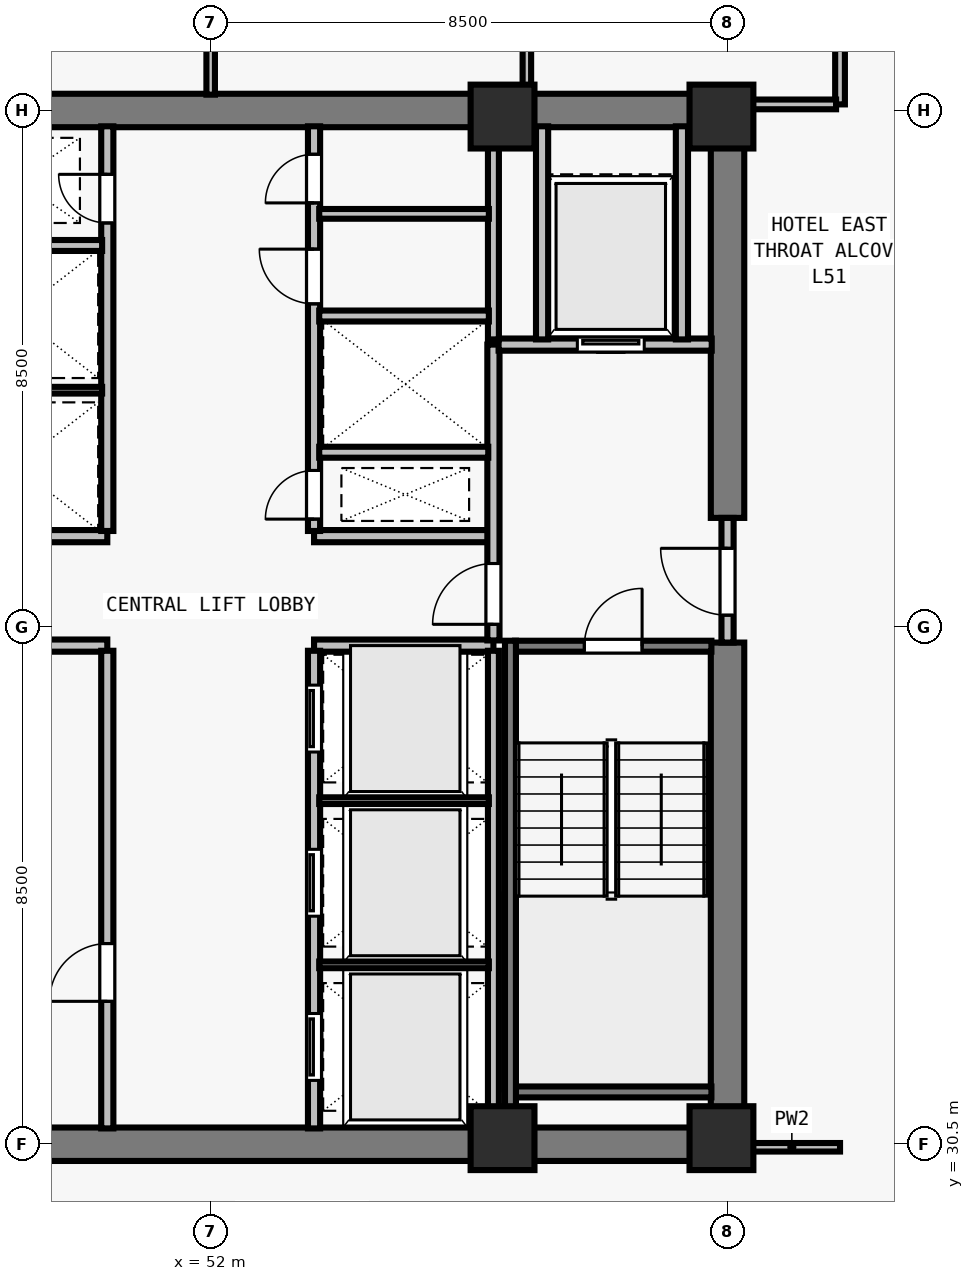
"""IFC4 building model, lengths in metres.
Left out: names, types, materials, properties, quantities, classifications, styles, units other than length and angle.
Written with IfcOpenShell. Run it as: python <this file> out.ifc"""

import sys

from ifc_helpers import new_model, si_unit, direction, frame, frame_2d, origin, origin_2d, place, context, subcontext, project, spatial, rectangle, extrude, element, fill, save


model = new_model("IFC4")
c1 = context("Model", 3, precision=1e-05, world=origin(), true_north=direction((0.0, 1.0)))
c2 = subcontext(c1, "Body", "Model", "MODEL_VIEW")
j1 = project(units=[si_unit("LENGTHUNIT", "METRE"), si_unit("PLANEANGLEUNIT", "RADIAN")], contexts=[c1])
p1 = place(None, origin())
s1 = spatial("IfcSite", under=j1, at=p1, CompositionType="ELEMENT")
p2 = place(p1, origin())
s2 = spatial("IfcBuilding", under=s1, at=p2, CompositionType="ELEMENT")
p3 = place(p2, frame((0.0, 0.0, 186.5)))
s3 = spatial("IfcBuildingStorey", under=s2, at=p3, CompositionType="ELEMENT", Elevation=186.5)
for number, where, z_axis, x_axis in (
    (1, (56.8, 30.6, 0.0), (0.0, 0.0, 1.0), (1.0, 0.0, 0.0)),
    (2, (60.4, 30.6, 0.0), (0.0, 0.0, 1.0), (1.0, 0.0, 0.0)),
    (3, (56.8, 47.4, 0.0), (0.0, 0.0, 1.0), (1.0, 0.0, 0.0)),
    (4, (60.4, 47.4, 0.0), (0.0, 0.0, 1.0), (1.0, 0.0, 0.0)),
):
    element("IfcColumn", number, at=place(p3, frame(where, z_axis=z_axis, x_axis=x_axis)), inside=s3, PredefinedType="COLUMN", context=c2, shape_type="SweptSolid", body=[
        extrude(rectangle(XDim=1.05, YDim=1.05, at=origin_2d()), origin(), (0.0, 0.0, 1.0), 3.5),
    ])
for number, where, z_axis, x_axis in (
    (5, (43.225, 30.5, 0.0), (0.0, 0.0, 1.0), (1.0, 0.0, 0.0)),
    (6, (43.225, 47.5, 0.0), (0.0, 0.0, 1.0), (1.0, 0.0, 0.0)),
):
    element("IfcWall", number, at=place(p3, frame(where, z_axis=z_axis, x_axis=x_axis)), inside=s3, PredefinedType="SHEAR", context=c2, shape_type="SweptSolid", body=[
        extrude(rectangle(XDim=17.55, YDim=0.55, at=frame_2d((8.775, 0.0))), origin(), (0.0, 0.0, 1.0), 3.28),
    ])
p4 = place(p3, frame((60.5, 30.765, 0.0), z_axis=(0.0, 0.0, 1.0), x_axis=(0.0, 1.0, 0.0)))
e7 = element("IfcWall", 7, at=p4, inside=s3, PredefinedType="SHEAR", context=c2, shape_type="SweptSolid", body=[
    extrude(rectangle(XDim=7.985, YDim=0.55, at=frame_2d((3.993, 0.0))), origin(), (0.0, 0.0, 1.0), 3.28),
])
p5 = place(p3, frame((60.5, 40.8, 0.0), z_axis=(0.0, 0.0, 1.0), x_axis=(0.0, 1.0, 0.0)))
e8 = element("IfcWall", 8, at=p5, inside=s3, PredefinedType="SHEAR", context=c2, shape_type="SweptSolid", body=[
    extrude(rectangle(XDim=6.435, YDim=0.55, at=frame_2d((3.218, 0.0))), origin(), (0.0, 0.0, 1.0), 3.28),
])
for number, where, z_axis, x_axis in (
    (9, (47.35, 38.7, 0.0), (0.0, 0.0, 1.0), (1.0, 0.0, 0.0)),
    (10, (47.35, 40.5, 0.0), (0.0, 0.0, 1.0), (1.0, 0.0, 0.0)),
    (11, (53.7, 38.7, 0.0), (0.0, 0.0, 1.0), (1.0, 0.0, 0.0)),
    (12, (53.7, 40.5, 0.0), (0.0, 0.0, 1.0), (1.0, 0.0, 0.0)),
):
    element("IfcWall", number, at=place(p3, frame(where, z_axis=z_axis, x_axis=x_axis)), inside=s3, PredefinedType="SOLIDWALL", context=c2, shape_type="SweptSolid", body=[
        extrude(rectangle(XDim=2.95, YDim=0.2, at=frame_2d((1.475, 0.0))), origin(), (0.0, 0.0, 1.0), 3.28),
    ])
p6 = place(p3, frame((50.3, 30.76, 0.0), z_axis=(0.0, 0.0, 1.0), x_axis=(0.0, 1.0, 0.0)))
e13 = element("IfcWall", 13, at=p6, inside=s3, PredefinedType="SOLIDWALL", context=c2, shape_type="SweptSolid", body=[
    extrude(rectangle(XDim=7.855, YDim=0.2, at=frame_2d((3.927, 0.0))), origin(), (0.0, 0.0, 1.0), 3.28),
])
p7 = place(p6, frame((2.09, 0.0, 0.0)))
e14 = element("IfcOpeningElement", 14, at=p7, cuts=e13, PredefinedType="OPENING", context=c2, shape_type="SweptSolid", body=[
    extrude(rectangle(XDim=0.95, YDim=2.12, at=frame_2d((0.475, 1.06))), frame((0.0, 0.11, 0.0), z_axis=(0.0, -1.0, 0.0), x_axis=(1.0, 0.0, 0.0)), (0.0, 0.0, 1.0), 0.22),
])
p8 = place(p3, frame((53.7, 30.76, 0.0), z_axis=(0.0, 0.0, 1.0), x_axis=(0.0, 1.0, 0.0)))
e15 = element("IfcWall", 15, at=p8, inside=s3, PredefinedType="SOLIDWALL", context=c2, shape_type="SweptSolid", body=[
    extrude(rectangle(XDim=7.855, YDim=0.2, at=frame_2d((3.927, 0.0))), origin(), (0.0, 0.0, 1.0), 3.28),
])
p9 = place(p8, frame((0.79, 0.0, 0.0)))
e16 = element("IfcOpeningElement", 16, at=p9, cuts=e15, PredefinedType="OPENING", context=c2, shape_type="SweptSolid", body=[
    extrude(rectangle(XDim=1.1, YDim=2.2, at=frame_2d((0.55, 1.1))), frame((0.0, 0.11, 0.0), z_axis=(0.0, -1.0, 0.0), x_axis=(1.0, 0.0, 0.0)), (0.0, 0.0, 1.0), 0.22),
])
p10 = place(p8, frame((3.49, 0.0, 0.0)))
e17 = element("IfcOpeningElement", 17, at=p10, cuts=e15, PredefinedType="OPENING", context=c2, shape_type="SweptSolid", body=[
    extrude(rectangle(XDim=1.1, YDim=2.2, at=frame_2d((0.55, 1.1))), frame((0.0, 0.11, 0.0), z_axis=(0.0, -1.0, 0.0), x_axis=(1.0, 0.0, 0.0)), (0.0, 0.0, 1.0), 0.22),
])
p11 = place(p8, frame((6.19, 0.0, 0.0)))
e18 = element("IfcOpeningElement", 18, at=p11, cuts=e15, PredefinedType="OPENING", context=c2, shape_type="SweptSolid", body=[
    extrude(rectangle(XDim=1.1, YDim=2.2, at=frame_2d((0.55, 1.1))), frame((0.0, 0.11, 0.0), z_axis=(0.0, -1.0, 0.0), x_axis=(1.0, 0.0, 0.0)), (0.0, 0.0, 1.0), 0.22),
])
p12 = place(p3, frame((50.3, 40.585, 0.0), z_axis=(0.0, 0.0, 1.0), x_axis=(0.0, 1.0, 0.0)))
e19 = element("IfcWall", 19, at=p12, inside=s3, PredefinedType="SOLIDWALL", context=c2, shape_type="SweptSolid", body=[
    extrude(rectangle(XDim=6.655, YDim=0.2, at=frame_2d((3.328, 0.0))), origin(), (0.0, 0.0, 1.0), 3.28),
])
p13 = place(p12, frame((5.065, 0.0, 0.0)))
e20 = element("IfcOpeningElement", 20, at=p13, cuts=e19, PredefinedType="OPENING", context=c2, shape_type="SweptSolid", body=[
    extrude(rectangle(XDim=0.8, YDim=2.08, at=frame_2d((0.4, 1.04))), frame((0.0, 0.11, 0.0), z_axis=(0.0, -1.0, 0.0), x_axis=(1.0, 0.0, 0.0)), (0.0, 0.0, 1.0), 0.22),
])
p14 = place(p3, frame((53.7, 40.585, 0.0), z_axis=(0.0, 0.0, 1.0), x_axis=(0.0, 1.0, 0.0)))
e21 = element("IfcWall", 21, at=p14, inside=s3, PredefinedType="SOLIDWALL", context=c2, shape_type="SweptSolid", body=[
    extrude(rectangle(XDim=6.655, YDim=0.2, at=frame_2d((3.328, 0.0))), origin(), (0.0, 0.0, 1.0), 3.28),
])
p15 = place(p14, frame((0.195, 0.0, 0.0)))
e22 = element("IfcOpeningElement", 22, at=p15, cuts=e21, PredefinedType="OPENING", context=c2, shape_type="SweptSolid", body=[
    extrude(rectangle(XDim=0.8, YDim=2.08, at=frame_2d((0.4, 1.04))), frame((0.0, 0.11, 0.0), z_axis=(0.0, -1.0, 0.0), x_axis=(1.0, 0.0, 0.0)), (0.0, 0.0, 1.0), 0.22),
])
p16 = place(p14, frame((3.735, 0.0, 0.0)))
e23 = element("IfcOpeningElement", 23, at=p16, cuts=e21, PredefinedType="OPENING", context=c2, shape_type="SweptSolid", body=[
    extrude(rectangle(XDim=0.9, YDim=2.12, at=frame_2d((0.45, 1.06))), frame((0.0, 0.11, 0.0), z_axis=(0.0, -1.0, 0.0), x_axis=(1.0, 0.0, 0.0)), (0.0, 0.0, 1.0), 0.22),
])
p17 = place(p14, frame((5.395, 0.0, 0.0)))
e24 = element("IfcOpeningElement", 24, at=p17, cuts=e21, PredefinedType="OPENING", context=c2, shape_type="SweptSolid", body=[
    extrude(rectangle(XDim=0.8, YDim=2.1, at=frame_2d((0.4, 1.05))), frame((0.0, 0.11, 0.0), z_axis=(0.0, -1.0, 0.0), x_axis=(1.0, 0.0, 0.0)), (0.0, 0.0, 1.0), 0.22),
])
p18 = place(p3, frame((60.5, 38.75, 0.0), z_axis=(0.0, 0.0, 1.0), x_axis=(0.0, 1.0, 0.0)))
e25 = element("IfcWall", 25, at=p18, inside=s3, PredefinedType="SOLIDWALL", context=c2, shape_type="SweptSolid", body=[
    extrude(rectangle(XDim=2.05, YDim=0.2, at=frame_2d((1.025, 0.0))), origin(), (0.0, 0.0, 1.0), 3.28),
])
p19 = place(p18, frame((0.45, 0.0, 0.0)))
e26 = element("IfcOpeningElement", 26, at=p19, cuts=e25, PredefinedType="OPENING", context=c2, shape_type="SweptSolid", body=[
    extrude(rectangle(XDim=1.1, YDim=2.15, at=frame_2d((0.55, 1.075))), frame((0.0, 0.11, 0.0), z_axis=(0.0, -1.0, 0.0), x_axis=(1.0, 0.0, 0.0)), (0.0, 0.0, 1.0), 0.22),
])
p20 = place(p3, frame((56.65, 38.785, 0.0), z_axis=(0.0, 0.0, 1.0), x_axis=(0.0, 1.0, 0.0)))
e27 = element("IfcWall", 27, at=p20, inside=s3, PredefinedType="SOLIDWALL", context=c2, shape_type="SweptSolid", body=[
    extrude(rectangle(XDim=4.865, YDim=0.2, at=frame_2d((2.433, 0.0))), origin(), (0.0, 0.0, 1.0), 3.28),
])
p21 = place(p20, frame((0.265, 0.0, 0.0)))
e28 = element("IfcOpeningElement", 28, at=p21, cuts=e27, PredefinedType="OPENING", context=c2, shape_type="SweptSolid", body=[
    extrude(rectangle(XDim=1.0, YDim=2.15, at=frame_2d((0.5, 1.075))), frame((0.0, 0.11, 0.0), z_axis=(0.0, -1.0, 0.0), x_axis=(1.0, 0.0, 0.0)), (0.0, 0.0, 1.0), 0.22),
])
p22 = place(p3, frame((56.735, 43.65, 0.0), z_axis=(0.0, 0.0, 1.0), x_axis=(1.0, 0.0, 0.0)))
e29 = element("IfcWall", 29, at=p22, inside=s3, PredefinedType="SOLIDWALL", context=c2, shape_type="SweptSolid", body=[
    extrude(rectangle(XDim=3.505, YDim=0.2, at=frame_2d((1.752, 0.0))), origin(), (0.0, 0.0, 1.0), 3.28),
])
p23 = place(p22, frame((1.295, 0.0, 0.0)))
e30 = element("IfcOpeningElement", 30, at=p23, cuts=e29, PredefinedType="OPENING", context=c2, shape_type="SweptSolid", body=[
    extrude(rectangle(XDim=1.1, YDim=2.2, at=frame_2d((0.55, 1.1))), frame((0.0, 0.11, 0.0), z_axis=(0.0, -1.0, 0.0), x_axis=(1.0, 0.0, 0.0)), (0.0, 0.0, 1.0), 0.22),
])
for number, where, z_axis, x_axis in (
    (31, (57.45, 43.735, 0.0), (0.0, 0.0, 1.0), (0.0, 1.0, 0.0)),
    (32, (59.75, 43.735, 0.0), (0.0, 0.0, 1.0), (0.0, 1.0, 0.0)),
):
    element("IfcWall", number, at=place(p3, frame(where, z_axis=z_axis, x_axis=x_axis)), inside=s3, PredefinedType="SOLIDWALL", context=c2, shape_type="SweptSolid", body=[
        extrude(rectangle(XDim=3.505, YDim=0.2, at=frame_2d((1.752, 0.0))), origin(), (0.0, 0.0, 1.0), 3.28),
    ])
p24 = place(p3, frame((56.65, 30.76, 0.0), z_axis=(0.0, 0.0, 1.0), x_axis=(0.0, 1.0, 0.0)))
e33 = element("IfcWall", 33, at=p24, inside=s3, PredefinedType="SOLIDWALL", context=c2, shape_type="SweptSolid", body=[
    extrude(rectangle(XDim=7.855, YDim=0.18, at=frame_2d((3.927, 0.0))), origin(), (0.0, 0.0, 1.0), 3.28),
])
for number, where, z_axis, x_axis in (
    (34, (53.785, 33.45, 0.0), (0.0, 0.0, 1.0), (1.0, 0.0, 0.0)),
    (35, (53.785, 36.15, 0.0), (0.0, 0.0, 1.0), (1.0, 0.0, 0.0)),
):
    element("IfcWall", number, at=place(p3, frame(where, z_axis=z_axis, x_axis=x_axis)), inside=s3, PredefinedType="PARTITIONING", context=c2, shape_type="SweptSolid", body=[
        extrude(rectangle(XDim=2.79, YDim=0.11, at=frame_2d((1.395, 0.0))), origin(), (0.0, 0.0, 1.0), 3.28),
    ])
p25 = place(p3, frame((47.435, 42.9, 0.0), z_axis=(0.0, 0.0, 1.0), x_axis=(1.0, 0.0, 0.0)))
e36 = element("IfcWall", 36, at=p25, inside=s3, PredefinedType="PARTITIONING", context=c2, shape_type="SweptSolid", body=[
    extrude(rectangle(XDim=2.78, YDim=0.11, at=frame_2d((1.39, 0.0))), origin(), (0.0, 0.0, 1.0), 3.28),
])
p26 = place(p3, frame((47.425, 45.28, 0.0), z_axis=(0.0, 0.0, 1.0), x_axis=(1.0, 0.0, 0.0)))
e37 = element("IfcWall", 37, at=p26, inside=s3, PredefinedType="SOLIDWALL", context=c2, shape_type="SweptSolid", body=[
    extrude(rectangle(XDim=2.79, YDim=0.18, at=frame_2d((1.395, 0.0))), origin(), (0.0, 0.0, 1.0), 3.28),
])
p27 = place(p3, frame((56.65, 43.735, 0.0), z_axis=(0.0, 0.0, 1.0), x_axis=(0.0, 1.0, 0.0)))
e38 = element("IfcWall", 38, at=p27, inside=s3, PredefinedType="SOLIDWALL", context=c2, shape_type="SweptSolid", body=[
    extrude(rectangle(XDim=3.505, YDim=0.18, at=frame_2d((1.752, 0.0))), origin(), (0.0, 0.0, 1.0), 3.28),
])
p28 = place(p3, frame((53.785, 41.88, 0.0), z_axis=(0.0, 0.0, 1.0), x_axis=(1.0, 0.0, 0.0)))
e39 = element("IfcWall", 39, at=p28, inside=s3, PredefinedType="SOLIDWALL", context=c2, shape_type="SweptSolid", body=[
    extrude(rectangle(XDim=2.78, YDim=0.18, at=frame_2d((1.39, 0.0))), origin(), (0.0, 0.0, 1.0), 3.28),
])
p29 = place(p3, frame((53.785, 44.12, 0.0), z_axis=(0.0, 0.0, 1.0), x_axis=(1.0, 0.0, 0.0)))
e40 = element("IfcWall", 40, at=p29, inside=s3, PredefinedType="SOLIDWALL", context=c2, shape_type="SweptSolid", body=[
    extrude(rectangle(XDim=2.79, YDim=0.18, at=frame_2d((1.395, 0.0))), origin(), (0.0, 0.0, 1.0), 3.28),
])
p30 = place(p3, frame((53.785, 45.8, 0.0), z_axis=(0.0, 0.0, 1.0), x_axis=(1.0, 0.0, 0.0)))
e41 = element("IfcWall", 41, at=p30, inside=s3, PredefinedType="PARTITIONING", context=c2, shape_type="SweptSolid", body=[
    extrude(rectangle(XDim=2.79, YDim=0.16, at=frame_2d((1.395, 0.0))), origin(), (0.0, 0.0, 1.0), 3.28),
])
p31 = place(p3, frame((62.35, 47.6, 0.0), z_axis=(0.0, 0.0, 1.0), x_axis=(0.0, 1.0, 0.0)))
e42 = element("IfcWall", 42, at=p31, inside=s3, PredefinedType="PARTITIONING", context=c2, shape_type="SweptSolid", body=[
    extrude(rectangle(XDim=15.075, YDim=0.16, at=frame_2d((7.538, 0.0))), origin(), (0.0, 0.0, 1.0), 2.555),
])
p32 = place(p31, frame((3.2, 0.0, 0.0)))
e43 = element("IfcOpeningElement", 43, at=p32, cuts=e42, PredefinedType="OPENING", context=c2, shape_type="SweptSolid", body=[
    extrude(rectangle(XDim=0.92, YDim=2.12, at=frame_2d((0.46, 1.06))), frame((0.0, 0.09, 0.0), z_axis=(0.0, -1.0, 0.0), x_axis=(1.0, 0.0, 0.0)), (0.0, 0.0, 1.0), 0.18),
])
p33 = place(p3, frame((60.765, 30.45, 0.0), z_axis=(0.0, 0.0, 1.0), x_axis=(1.0, 0.0, 0.0)))
e44 = element("IfcWall", 44, at=p33, inside=s3, PredefinedType="PARTITIONING", context=c2, shape_type="SweptSolid", body=[
    extrude(rectangle(XDim=1.585, YDim=0.14, at=frame_2d((0.792, 0.0))), origin(), (0.0, 0.0, 1.0), 3.28),
])
p34 = place(p3, frame((60.765, 47.6, 0.0), z_axis=(0.0, 0.0, 1.0), x_axis=(1.0, 0.0, 0.0)))
e45 = element("IfcWall", 45, at=p34, inside=s3, PredefinedType="PARTITIONING", context=c2, shape_type="SweptSolid", body=[
    extrude(rectangle(XDim=1.52, YDim=0.16, at=frame_2d((0.76, 0.0))), origin(), (0.0, 0.0, 1.0), 3.28),
])
p35 = place(p3, frame((52.0, 47.76, 0.0), z_axis=(0.0, 0.0, 1.0), x_axis=(0.0, 1.0, 0.0)))
e46 = element("IfcWall", 46, at=p35, inside=s3, PredefinedType="PARTITIONING", context=c2, shape_type="SweptSolid", body=[
    extrude(rectangle(XDim=14.915, YDim=0.14, at=frame_2d((7.458, 0.0))), origin(), (0.0, 0.0, 1.0), 2.896),
])
p36 = place(p35, frame((2.34, 0.0, 0.0)))
e47 = element("IfcOpeningElement", 47, at=p36, cuts=e46, PredefinedType="OPENING", context=c2, shape_type="SweptSolid", body=[
    extrude(rectangle(XDim=0.92, YDim=2.12, at=frame_2d((0.46, 1.06))), frame((0.0, 0.08, 0.0), z_axis=(0.0, -1.0, 0.0), x_axis=(1.0, 0.0, 0.0)), (0.0, 0.0, 1.0), 0.16),
])
p37 = place(p3, frame((57.2, 47.76, 0.0), z_axis=(0.0, 0.0, 1.0), x_axis=(0.0, 1.0, 0.0)))
e48 = element("IfcWall", 48, at=p37, inside=s3, PredefinedType="PARTITIONING", context=c2, shape_type="SweptSolid", body=[
    extrude(rectangle(XDim=14.915, YDim=0.14, at=frame_2d((7.458, 0.0))), origin(), (0.0, 0.0, 1.0), 3.28),
])
p38 = place(p3, frame((57.005, 38.69, 0.0), z_axis=(0.0, 0.0, 1.0), x_axis=(1.0, 0.0, 0.0)))
e49 = element("IfcWall", 49, at=p38, inside=s3, PredefinedType="SOLIDWALL", context=c2, shape_type="SweptSolid", body=[
    extrude(rectangle(XDim=3.23, YDim=0.18, at=frame_2d((1.615, 0.0))), origin(), (0.0, 0.0, 1.0), 3.28),
])
p39 = place(p38, frame((1.14, 0.0, 0.0)))
e50 = element("IfcOpeningElement", 50, at=p39, cuts=e49, PredefinedType="OPENING", context=c2, shape_type="SweptSolid", body=[
    extrude(rectangle(XDim=0.95, YDim=2.15, at=frame_2d((0.475, 1.075))), frame((0.0, 0.1, 0.0), z_axis=(0.0, -1.0, 0.0), x_axis=(1.0, 0.0, 0.0)), (0.0, 0.0, 1.0), 0.2),
])
p40 = place(p3, frame((57.005, 31.36, 0.0), z_axis=(0.0, 0.0, 1.0), x_axis=(1.0, 0.0, 0.0)))
e51 = element("IfcWall", 51, at=p40, inside=s3, PredefinedType="SOLIDWALL", context=c2, shape_type="SweptSolid", body=[
    extrude(rectangle(XDim=3.23, YDim=0.18, at=frame_2d((1.615, 0.0))), origin(), (0.0, 0.0, 1.0), 3.28),
])
p41 = place(p3, frame((56.93, 38.78, 0.0), z_axis=(0.0, 0.0, 1.0), x_axis=(0.0, -1.0, 0.0)))
e52 = element("IfcWall", 52, at=p41, inside=s3, PredefinedType="SOLIDWALL", context=c2, shape_type="SweptSolid", body=[
    extrude(rectangle(XDim=8.017, YDim=0.18, at=frame_2d((4.009, 0.0))), origin(), (0.0, 0.0, 1.0), 3.28),
])
p42 = place(p19, origin())
e53 = element("IfcDoor", 53, at=p42, inside=s3, OperationType="SINGLE_SWING_RIGHT", PredefinedType="DOOR", context=c2, shape_type="SweptSolid", body=[
    extrude(rectangle(XDim=1.1, YDim=2.15, at=frame_2d((0.55, 1.075))), frame((0.0, 0.025, 0.0), z_axis=(0.0, -1.0, 0.0), x_axis=(1.0, 0.0, 0.0)), (0.0, 0.0, 1.0), 0.05),
])
fill(e26, e53)
p43 = place(p21, origin())
e54 = element("IfcDoor", 54, at=p43, inside=s3, OperationType="SINGLE_SWING_LEFT", PredefinedType="DOOR", context=c2, shape_type="SweptSolid", body=[
    extrude(rectangle(XDim=1.0, YDim=2.15, at=frame_2d((0.5, 1.075))), frame((0.0, 0.025, 0.0), z_axis=(0.0, -1.0, 0.0), x_axis=(1.0, 0.0, 0.0)), (0.0, 0.0, 1.0), 0.05),
])
fill(e28, e54)
p44 = place(p23, origin())
e55 = element("IfcDoor", 55, at=p44, inside=s3, OperationType="SLIDING_TO_LEFT", PredefinedType="DOOR", context=c2, shape_type="SweptSolid", body=[
    extrude(rectangle(XDim=1.1, YDim=2.2, at=frame_2d((0.55, 1.1))), frame((0.0, 0.025, 0.0), z_axis=(0.0, -1.0, 0.0), x_axis=(1.0, 0.0, 0.0)), (0.0, 0.0, 1.0), 0.05),
])
fill(e30, e55)
p45 = place(p7, origin())
e56 = element("IfcDoor", 56, at=p45, inside=s3, OperationType="SINGLE_SWING_LEFT", PredefinedType="DOOR", context=c2, shape_type="SweptSolid", body=[
    extrude(rectangle(XDim=0.95, YDim=2.12, at=frame_2d((0.475, 1.06))), frame((0.0, 0.025, 0.0), z_axis=(0.0, -1.0, 0.0), x_axis=(1.0, 0.0, 0.0)), (0.0, 0.0, 1.0), 0.05),
])
fill(e14, e56)
p46 = place(p9, origin())
e57 = element("IfcDoor", 57, at=p46, inside=s3, OperationType="SLIDING_TO_LEFT", PredefinedType="DOOR", context=c2, shape_type="SweptSolid", body=[
    extrude(rectangle(XDim=1.1, YDim=2.2, at=frame_2d((0.55, 1.1))), frame((0.0, 0.025, 0.0), z_axis=(0.0, -1.0, 0.0), x_axis=(1.0, 0.0, 0.0)), (0.0, 0.0, 1.0), 0.05),
])
fill(e16, e57)
p47 = place(p10, origin())
e58 = element("IfcDoor", 58, at=p47, inside=s3, OperationType="SLIDING_TO_LEFT", PredefinedType="DOOR", context=c2, shape_type="SweptSolid", body=[
    extrude(rectangle(XDim=1.1, YDim=2.2, at=frame_2d((0.55, 1.1))), frame((0.0, 0.025, 0.0), z_axis=(0.0, -1.0, 0.0), x_axis=(1.0, 0.0, 0.0)), (0.0, 0.0, 1.0), 0.05),
])
fill(e17, e58)
p48 = place(p11, origin())
e59 = element("IfcDoor", 59, at=p48, inside=s3, OperationType="SLIDING_TO_LEFT", PredefinedType="DOOR", context=c2, shape_type="SweptSolid", body=[
    extrude(rectangle(XDim=1.1, YDim=2.2, at=frame_2d((0.55, 1.1))), frame((0.0, 0.025, 0.0), z_axis=(0.0, -1.0, 0.0), x_axis=(1.0, 0.0, 0.0)), (0.0, 0.0, 1.0), 0.05),
])
fill(e18, e59)
p49 = place(p13, origin())
e60 = element("IfcDoor", 60, at=p49, inside=s3, OperationType="SINGLE_SWING_RIGHT", PredefinedType="DOOR", context=c2, shape_type="SweptSolid", body=[
    extrude(rectangle(XDim=0.8, YDim=2.08, at=frame_2d((0.4, 1.04))), frame((0.0, 0.025, 0.0), z_axis=(0.0, -1.0, 0.0), x_axis=(1.0, 0.0, 0.0)), (0.0, 0.0, 1.0), 0.05),
])
fill(e20, e60)
p50 = place(p15, origin())
e61 = element("IfcDoor", 61, at=p50, inside=s3, OperationType="SINGLE_SWING_LEFT", PredefinedType="DOOR", context=c2, shape_type="SweptSolid", body=[
    extrude(rectangle(XDim=0.8, YDim=2.08, at=frame_2d((0.4, 1.04))), frame((0.0, 0.025, 0.0), z_axis=(0.0, -1.0, 0.0), x_axis=(1.0, 0.0, 0.0)), (0.0, 0.0, 1.0), 0.05),
])
fill(e22, e61)
p51 = place(p16, origin())
e62 = element("IfcDoor", 62, at=p51, inside=s3, OperationType="SINGLE_SWING_RIGHT", PredefinedType="DOOR", context=c2, shape_type="SweptSolid", body=[
    extrude(rectangle(XDim=0.9, YDim=2.12, at=frame_2d((0.45, 1.06))), frame((0.0, 0.025, 0.0), z_axis=(0.0, -1.0, 0.0), x_axis=(1.0, 0.0, 0.0)), (0.0, 0.0, 1.0), 0.05),
])
fill(e23, e62)
p52 = place(p17, origin())
e63 = element("IfcDoor", 63, at=p52, inside=s3, OperationType="SINGLE_SWING_LEFT", PredefinedType="DOOR", context=c2, shape_type="SweptSolid", body=[
    extrude(rectangle(XDim=0.8, YDim=2.1, at=frame_2d((0.4, 1.05))), frame((0.0, 0.025, 0.0), z_axis=(0.0, -1.0, 0.0), x_axis=(1.0, 0.0, 0.0)), (0.0, 0.0, 1.0), 0.05),
])
fill(e24, e63)
p53 = place(p39, origin())
e64 = element("IfcDoor", 64, at=p53, inside=s3, OperationType="SINGLE_SWING_RIGHT", PredefinedType="DOOR", context=c2, shape_type="SweptSolid", body=[
    extrude(rectangle(XDim=0.95, YDim=2.15, at=frame_2d((0.475, 1.075))), frame((0.0, 0.025, 0.0), z_axis=(0.0, -1.0, 0.0), x_axis=(1.0, 0.0, 0.0)), (0.0, 0.0, 1.0), 0.05),
])
fill(e50, e64)
save(model, sys.argv[1])
